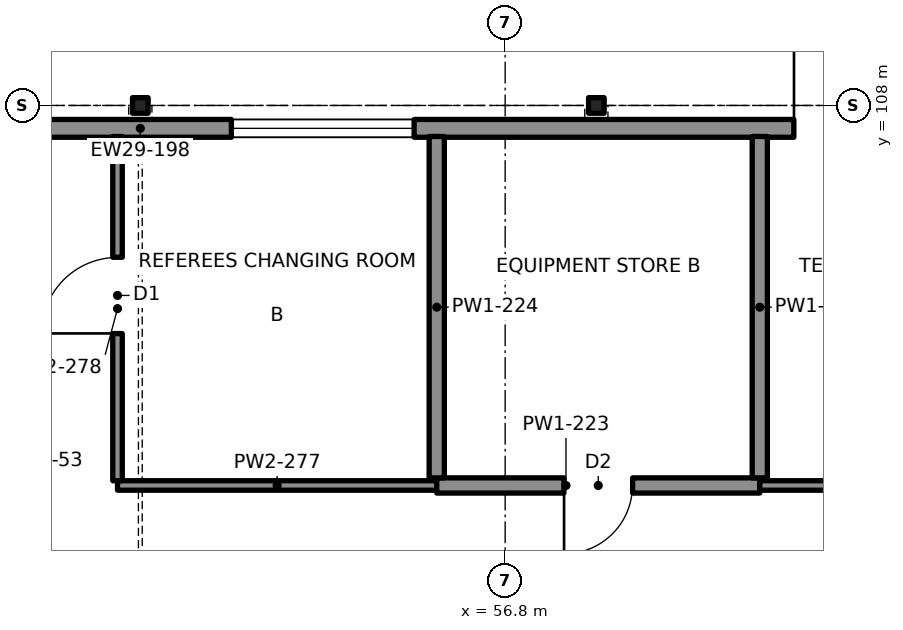
"""IFC4 building model, lengths in metres.
Left out: names, types, materials, properties, quantities, classifications, styles, units other than length and angle.
Written with IfcOpenShell. Run it as: python <this file> out.ifc"""

import sys

from ifc_helpers import new_model, si_unit, direction, frame, frame_2d, origin, origin_2d, place, context, subcontext, project, spatial, rectangle, i_section, extrude, element, fill, save


model = new_model("IFC4")
c1 = context("Model", 3, precision=1e-05, world=origin(), true_north=direction((0.0, 1.0)))
c2 = subcontext(c1, "Body", "Model", "MODEL_VIEW")
j1 = project(units=[si_unit("LENGTHUNIT", "METRE"), si_unit("PLANEANGLEUNIT", "RADIAN")], contexts=[c1])
p1 = place(None, origin())
s1 = spatial("IfcSite", under=j1, at=p1, CompositionType="ELEMENT")
p2 = place(p1, origin())
s2 = spatial("IfcBuilding", under=s1, at=p2, CompositionType="ELEMENT")
p3 = place(p2, origin())
s3 = spatial("IfcBuildingStorey", under=s2, at=p3, CompositionType="ELEMENT", Elevation=0.0)
for number, where, z_axis, x_axis in (
    (1, (52.0, 108.0, -0.5), (0.0, 0.0, 1.0), (1.0, 0.0, 0.0)),
    (2, (58.0, 108.0, -0.5), (0.0, 0.0, 1.0), (1.0, 0.0, 0.0)),
):
    element("IfcColumn", number, at=place(p3, frame(where, z_axis=z_axis, x_axis=x_axis)), inside=s3, PredefinedType="COLUMN", context=c2, shape_type="SweptSolid", body=[
        extrude(i_section(OverallWidth=0.205, OverallDepth=0.31, WebThickness=0.01, FlangeThickness=0.016, at=origin_2d()), origin(), (0.0, 0.0, 1.0), 4.9),
    ])
p4 = place(p3, frame((26.8, 107.699, 0.0), z_axis=(0.0, 0.0, 1.0), x_axis=(1.0, 0.0, 0.0)))
e3 = element("IfcWall", 3, at=p4, inside=s3, PredefinedType="SOLIDWALL", context=c2, shape_type="SweptSolid", body=[
    extrude(rectangle(XDim=50.4, YDim=0.234, at=frame_2d((25.2, 0.0))), origin(), (0.0, 0.0, 1.0), 4.4),
])
p5 = place(p4, frame((9.6, 0.0, 1.0)))
e4 = element("IfcOpeningElement", 4, at=p5, cuts=e3, PredefinedType="OPENING", context=c2, shape_type="SweptSolid", body=[
    extrude(rectangle(XDim=2.4, YDim=2.4, at=frame_2d((1.2, 1.2))), frame((0.0, 0.127, 0.0), z_axis=(0.0, -1.0, 0.0), x_axis=(1.0, 0.0, 0.0)), (0.0, 0.0, 1.0), 0.254),
])
p6 = place(p4, frame((21.6, 0.0, 1.0)))
e5 = element("IfcOpeningElement", 5, at=p6, cuts=e3, PredefinedType="OPENING", context=c2, shape_type="SweptSolid", body=[
    extrude(rectangle(XDim=2.4, YDim=2.4, at=frame_2d((1.2, 1.2))), frame((0.0, 0.127, 0.0), z_axis=(0.0, -1.0, 0.0), x_axis=(1.0, 0.0, 0.0)), (0.0, 0.0, 1.0), 0.254),
])
p7 = place(p4, frame((26.4, 0.0, 1.0)))
e6 = element("IfcOpeningElement", 6, at=p7, cuts=e3, PredefinedType="OPENING", context=c2, shape_type="SweptSolid", body=[
    extrude(rectangle(XDim=2.4, YDim=2.4, at=frame_2d((1.2, 1.2))), frame((0.0, 0.127, 0.0), z_axis=(0.0, -1.0, 0.0), x_axis=(1.0, 0.0, 0.0)), (0.0, 0.0, 1.0), 0.254),
])
p8 = place(p4, frame((38.4, 0.0, 1.0)))
e7 = element("IfcOpeningElement", 7, at=p8, cuts=e3, PredefinedType="OPENING", context=c2, shape_type="SweptSolid", body=[
    extrude(rectangle(XDim=2.4, YDim=2.4, at=frame_2d((1.2, 1.2))), frame((0.0, 0.127, 0.0), z_axis=(0.0, -1.0, 0.0), x_axis=(1.0, 0.0, 0.0)), (0.0, 0.0, 1.0), 0.254),
])
p9 = place(p4, frame((14.4, 0.0, 0.0)))
e8 = element("IfcOpeningElement", 8, at=p9, cuts=e3, PredefinedType="OPENING", context=c2, shape_type="SweptSolid", body=[
    extrude(rectangle(XDim=2.2, YDim=2.4, at=frame_2d((1.1, 1.2))), frame((0.0, 0.127, 0.0), z_axis=(0.0, -1.0, 0.0), x_axis=(1.0, 0.0, 0.0)), (0.0, 0.0, 1.0), 0.254),
])
p10 = place(p4, frame((33.8, 0.0, 0.0)))
e9 = element("IfcOpeningElement", 9, at=p10, cuts=e3, PredefinedType="OPENING", context=c2, shape_type="SweptSolid", body=[
    extrude(rectangle(XDim=2.2, YDim=2.4, at=frame_2d((1.1, 1.2))), frame((0.0, 0.127, 0.0), z_axis=(0.0, -1.0, 0.0), x_axis=(1.0, 0.0, 0.0)), (0.0, 0.0, 1.0), 0.254),
])
p11 = place(p4, frame((2.9, 0.0, 0.0)))
e10 = element("IfcOpeningElement", 10, at=p11, cuts=e3, PredefinedType="OPENING", context=c2, shape_type="SweptSolid", body=[
    extrude(rectangle(XDim=2.2, YDim=2.4, at=frame_2d((1.1, 1.2))), frame((0.0, 0.127, 0.0), z_axis=(0.0, -1.0, 0.0), x_axis=(1.0, 0.0, 0.0)), (0.0, 0.0, 1.0), 0.254),
])
p12 = place(p4, frame((44.9, 0.0, 0.0)))
e11 = element("IfcOpeningElement", 11, at=p12, cuts=e3, PredefinedType="OPENING", context=c2, shape_type="SweptSolid", body=[
    extrude(rectangle(XDim=2.2, YDim=2.4, at=frame_2d((1.1, 1.2))), frame((0.0, 0.127, 0.0), z_axis=(0.0, -1.0, 0.0), x_axis=(1.0, 0.0, 0.0)), (0.0, 0.0, 1.0), 0.254),
])
p13 = place(p3, frame((51.7, 103.0, 0.0), z_axis=(0.0, 0.0, 1.0), x_axis=(1.0, 0.0, 0.0)))
e12 = element("IfcWall", 12, at=p13, inside=s3, PredefinedType="PARTITIONING", context=c2, shape_type="SweptSolid", body=[
    extrude(rectangle(XDim=4.2, YDim=0.125, at=frame_2d((2.1, 0.0))), origin(), (0.0, 0.0, 1.0), 3.65),
])
p14 = place(p3, frame((55.9, 103.0, 0.0), z_axis=(0.0, 0.0, 1.0), x_axis=(1.0, 0.0, 0.0)))
e13 = element("IfcWall", 13, at=p14, inside=s3, PredefinedType="PARTITIONING", context=c2, shape_type="SweptSolid", body=[
    extrude(rectangle(XDim=4.25, YDim=0.2, at=frame_2d((2.125, 0.0))), origin(), (0.0, 0.0, 1.0), 3.65),
])
p15 = place(p14, frame((1.675, 0.0, 0.0)))
e14 = element("IfcOpeningElement", 14, at=p15, cuts=e13, PredefinedType="OPENING", context=c2, shape_type="SweptSolid", body=[
    extrude(rectangle(XDim=0.9, YDim=2.1, at=frame_2d((0.45, 1.05))), frame((0.0, 0.11, 0.0), z_axis=(0.0, -1.0, 0.0), x_axis=(1.0, 0.0, 0.0)), (0.0, 0.0, 1.0), 0.22),
])
p16 = place(p3, frame((60.15, 103.0, 0.0), z_axis=(0.0, 0.0, 1.0), x_axis=(1.0, 0.0, 0.0)))
e15 = element("IfcWall", 15, at=p16, inside=s3, PredefinedType="PARTITIONING", context=c2, shape_type="SweptSolid", body=[
    extrude(rectangle(XDim=8.45, YDim=0.125, at=frame_2d((4.225, 0.0))), origin(), (0.0, 0.0, 1.0), 3.65),
])
p17 = place(p16, frame((1.625, 0.0, 0.0)))
e16 = element("IfcOpeningElement", 16, at=p17, cuts=e15, PredefinedType="OPENING", context=c2, shape_type="SweptSolid", body=[
    extrude(rectangle(XDim=1.0, YDim=2.1, at=frame_2d((0.5, 1.05))), frame((0.0, 0.073, 0.0), z_axis=(0.0, -1.0, 0.0), x_axis=(1.0, 0.0, 0.0)), (0.0, 0.0, 1.0), 0.145),
])
p18 = place(p3, frame((51.7, 103.062, 0.0), z_axis=(0.0, 0.0, 1.0), x_axis=(0.0, 1.0, 0.0)))
e17 = element("IfcWall", 17, at=p18, inside=s3, PredefinedType="PARTITIONING", context=c2, shape_type="SweptSolid", body=[
    extrude(rectangle(XDim=4.529, YDim=0.125, at=frame_2d((2.265, 0.0))), origin(), (0.0, 0.0, 1.0), 3.65),
])
p19 = place(p18, frame((1.938, 0.0, 0.0)))
e18 = element("IfcOpeningElement", 18, at=p19, cuts=e17, PredefinedType="OPENING", context=c2, shape_type="SweptSolid", body=[
    extrude(rectangle(XDim=1.0, YDim=2.1, at=frame_2d((0.5, 1.05))), frame((0.0, 0.073, 0.0), z_axis=(0.0, -1.0, 0.0), x_axis=(1.0, 0.0, 0.0)), (0.0, 0.0, 1.0), 0.145),
])
for number, where, z_axis, x_axis in (
    (19, (55.9, 103.1, 0.0), (0.0, 0.0, 1.0), (0.0, 1.0, 0.0)),
    (20, (60.15, 103.1, 0.0), (0.0, 0.0, 1.0), (0.0, 1.0, 0.0)),
):
    element("IfcWall", number, at=place(p3, frame(where, z_axis=z_axis, x_axis=x_axis)), inside=s3, PredefinedType="PARTITIONING", context=c2, shape_type="SweptSolid", body=[
        extrude(rectangle(XDim=4.491, YDim=0.2, at=frame_2d((2.246, 0.0))), origin(), (0.0, 0.0, 1.0), 3.65),
    ])
p20 = place(p7, origin())
e21 = element("IfcWindow", 21, at=p20, inside=s3, PartitioningType="SINGLE_PANEL", PredefinedType="WINDOW", context=c2, shape_type="SweptSolid", body=[
    extrude(rectangle(XDim=2.4, YDim=2.4, at=frame_2d((1.2, 1.2))), frame((0.0, 0.03, 0.0), z_axis=(0.0, -1.0, 0.0), x_axis=(1.0, 0.0, 0.0)), (0.0, 0.0, 1.0), 0.06),
])
fill(e6, e21)
p21 = place(p10, origin())
e22 = element("IfcDoor", 22, at=p21, inside=s3, OperationType="DOUBLE_DOOR_SINGLE_SWING", PredefinedType="DOOR", context=c2, shape_type="SweptSolid", body=[
    extrude(rectangle(XDim=2.2, YDim=2.4, at=frame_2d((1.1, 1.2))), frame((0.0, 0.025, 0.0), z_axis=(0.0, -1.0, 0.0), x_axis=(1.0, 0.0, 0.0)), (0.0, 0.0, 1.0), 0.05),
])
fill(e9, e22)
p22 = place(p19, origin())
e23 = element("IfcDoor", 23, at=p22, inside=s3, OperationType="SINGLE_SWING_LEFT", PredefinedType="DOOR", context=c2, shape_type="SweptSolid", body=[
    extrude(rectangle(XDim=1.0, YDim=2.1, at=frame_2d((0.5, 1.05))), frame((0.0, 0.025, 0.0), z_axis=(0.0, -1.0, 0.0), x_axis=(1.0, 0.0, 0.0)), (0.0, 0.0, 1.0), 0.05),
])
fill(e18, e23)
p23 = place(p15, origin())
e24 = element("IfcDoor", 24, at=p23, inside=s3, OperationType="SINGLE_SWING_LEFT", PredefinedType="DOOR", context=c2, shape_type="SweptSolid", body=[
    extrude(rectangle(XDim=0.9, YDim=2.1, at=frame_2d((0.45, 1.05))), frame((0.0, 0.025, 0.0), z_axis=(0.0, -1.0, 0.0), x_axis=(1.0, 0.0, 0.0)), (0.0, 0.0, 1.0), 0.05),
])
fill(e14, e24)
save(model, sys.argv[1])
